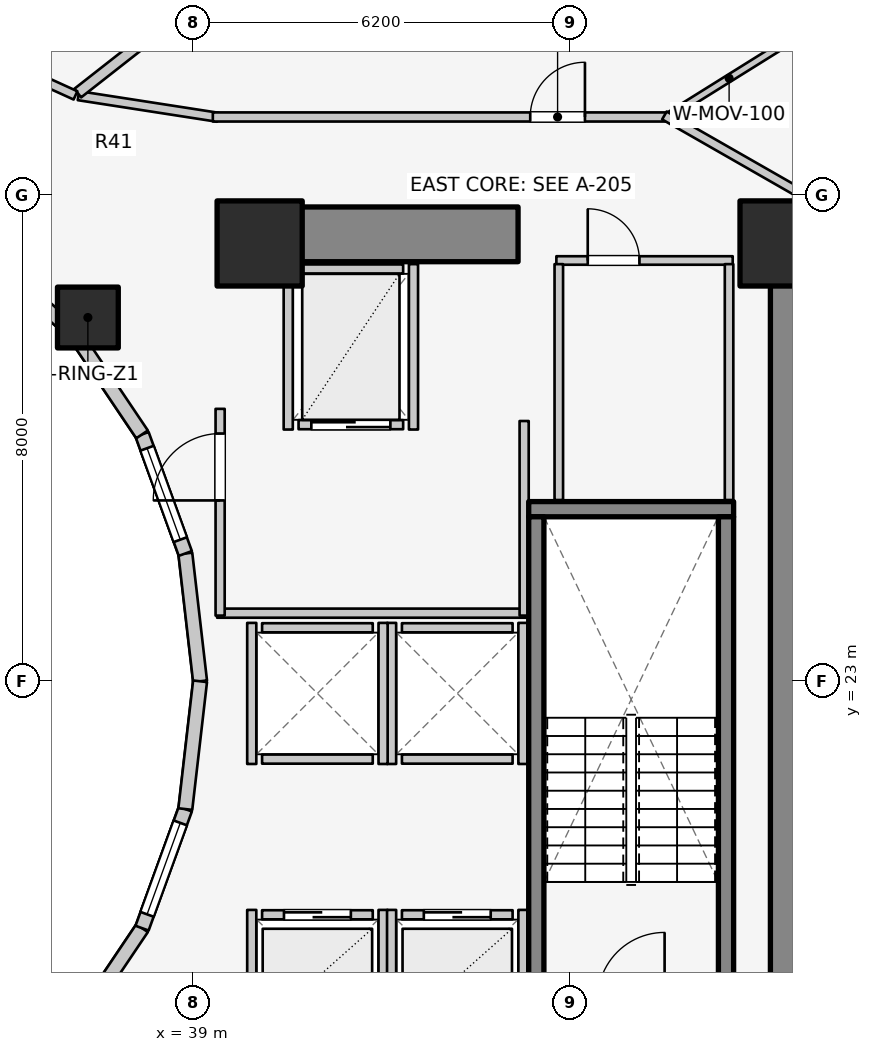
"""IFC4 building model, lengths in metres.
Left out: names, types, materials, properties, quantities, classifications, styles, units other than length and angle.
Written with IfcOpenShell. Run it as: python <this file> out.ifc"""

import sys

from ifc_helpers import new_model, si_unit, direction, frame, frame_2d, origin, origin_2d, place, context, subcontext, project, spatial, rectangle, extrude, element, fill, save


model = new_model("IFC4")
c1 = context("Model", 3, precision=1e-05, world=origin(), true_north=direction((0.0, 1.0)))
c2 = subcontext(c1, "Body", "Model", "MODEL_VIEW")
j1 = project(units=[si_unit("LENGTHUNIT", "METRE"), si_unit("PLANEANGLEUNIT", "RADIAN")], contexts=[c1])
p1 = place(None, origin())
s1 = spatial("IfcSite", under=j1, at=p1, CompositionType="ELEMENT")
p2 = place(p1, origin())
s2 = spatial("IfcBuilding", under=s1, at=p2, CompositionType="ELEMENT")
p3 = place(p2, frame((0.0, 0.0, 40.0)))
s3 = spatial("IfcBuildingStorey", under=s2, at=p3, CompositionType="ELEMENT", Elevation=40.0)
p4 = place(p3, frame((48.95, 17.05, 0.0), z_axis=(0.0, 0.0, 1.0), x_axis=(0.0, 1.0, 0.0)))
e1 = element("IfcWall", 1, at=p4, inside=s3, PredefinedType="SHEAR", context=c2, shape_type="SweptSolid", body=[
    extrude(rectangle(XDim=12.8, YDim=0.9, at=frame_2d((6.4, 0.0))), origin(), (0.0, 0.0, 1.0), 3.1),
])
p5 = place(p3, frame((39.85, 30.35, 0.0), z_axis=(0.0, 0.0, 1.0), x_axis=(1.0, 0.0, 0.0)))
e2 = element("IfcWall", 2, at=p5, inside=s3, PredefinedType="SHEAR", context=c2, shape_type="SweptSolid", body=[
    extrude(rectangle(XDim=4.5, YDim=0.9, at=frame_2d((2.25, 0.0))), origin(), (0.0, 0.0, 1.0), 3.1),
])
p6 = place(p3, frame((44.525, 25.83, 0.0), z_axis=(0.0, 0.0, 1.0), x_axis=(1.0, 0.0, 0.0)))
e3 = element("IfcWall", 3, at=p6, inside=s3, PredefinedType="SOLIDWALL", context=c2, shape_type="SweptSolid", body=[
    extrude(rectangle(XDim=3.37, YDim=0.25, at=frame_2d((1.685, 0.0))), origin(), (0.0, 0.0, 1.0), 3.1),
])
for number, where, z_axis, x_axis in (
    (4, (44.65, 17.895, 0.0), (0.0, 0.0, 1.0), (0.0, 1.0, 0.0)),
    (5, (47.77, 17.895, 0.0), (0.0, 0.0, 1.0), (0.0, 1.0, 0.0)),
):
    element("IfcWall", number, at=place(p3, frame(where, z_axis=z_axis, x_axis=x_axis)), inside=s3, PredefinedType="SOLIDWALL", context=c2, shape_type="SweptSolid", body=[
        extrude(rectangle(XDim=7.81, YDim=0.25, at=frame_2d((3.905, 0.0))), origin(), (0.0, 0.0, 1.0), 3.1),
    ])
for number, where, z_axis, x_axis in (
    (6, (48.7, 30.2, 0.0), (0.0, 0.0, 1.0), (1.0, 0.0, 0.0)),
    (7, (40.1, 30.2, 0.0), (0.0, 0.0, 1.0), (1.0, 0.0, 0.0)),
):
    element("IfcColumn", number, at=place(p3, frame(where, z_axis=z_axis, x_axis=x_axis)), inside=s3, PredefinedType="COLUMN", context=c2, shape_type="SweptSolid", body=[
        extrude(rectangle(XDim=1.4, YDim=1.4, at=origin_2d()), origin(), (0.0, 0.0, 1.0), 3.1),
    ])
p7 = place(p3, frame((37.275, 28.982, 0.0), z_axis=(0.0, 0.0, 1.0), x_axis=(1.0, 0.0, 0.0)))
e8 = element("IfcColumn", 8, at=p7, inside=s3, PredefinedType="COLUMN", context=c2, shape_type="SweptSolid", body=[
    extrude(rectangle(XDim=1.0, YDim=1.0, at=origin_2d()), origin(), (0.0, 0.0, 1.0), 3.1),
])
p8 = place(p3, frame((39.12, 23.0, 0.0), z_axis=(0.0, 0.0, 1.0), x_axis=(-0.114711713601, 0.993398823617, 0.0)))
e9 = element("IfcWall", 9, at=p8, inside=s3, PredefinedType="STANDARD", context=c2, shape_type="SweptSolid", body=[
    extrude(rectangle(XDim=2.115, YDim=0.23, at=frame_2d((1.058, 0.0))), origin(), (0.0, 0.0, 1.0), 2.84),
])
p9 = place(p3, frame((38.877, 25.102, 0.0), z_axis=(0.0, 0.0, 1.0), x_axis=(-0.341423187295, 0.93990968033, 0.0)))
e10 = element("IfcWall", 10, at=p9, inside=s3, PredefinedType="STANDARD", context=c2, shape_type="SweptSolid", body=[
    extrude(rectangle(XDim=2.084, YDim=0.23, at=frame_2d((1.042, 0.0))), origin(), (0.0, 0.0, 1.0), 2.84),
])
p10 = place(p9, frame((0.242, 0.0, 0.85)))
e11 = element("IfcOpeningElement", 11, at=p10, cuts=e10, PredefinedType="OPENING", context=c2, shape_type="SweptSolid", body=[
    extrude(rectangle(XDim=1.6, YDim=1.65, at=frame_2d((0.8, 0.825))), frame((0.0, 0.125, 0.0), z_axis=(0.0, -1.0, 0.0), x_axis=(1.0, 0.0, 0.0)), (0.0, 0.0, 1.0), 0.25),
])
p11 = place(p3, frame((38.166, 27.06, 0.0), z_axis=(0.0, 0.0, 1.0), x_axis=(-0.558197800898, 0.829707909492, 0.0)))
e12 = element("IfcWall", 12, at=p11, inside=s3, PredefinedType="STANDARD", context=c2, shape_type="SweptSolid", body=[
    extrude(rectangle(XDim=2.027, YDim=0.23, at=frame_2d((1.013, 0.0))), origin(), (0.0, 0.0, 1.0), 2.16),
])
p12 = place(p3, frame((37.035, 28.742, 0.0), z_axis=(0.0, 0.0, 1.0), x_axis=(-0.752576694707, 0.658504607869, 0.0)))
e13 = element("IfcWall", 13, at=p12, inside=s3, PredefinedType="STANDARD", context=c2, shape_type="SweptSolid", body=[
    extrude(rectangle(XDim=1.959, YDim=0.23, at=frame_2d((0.98, 0.0))), origin(), (0.0, 0.0, 1.0), 2.16),
])
p13 = place(p3, frame((37.035, 17.258, 0.0), z_axis=(0.0, 0.0, 1.0), x_axis=(0.558197800898, 0.829707909492, 0.0)))
e14 = element("IfcWall", 14, at=p13, inside=s3, PredefinedType="STANDARD", context=c2, shape_type="SweptSolid", body=[
    extrude(rectangle(XDim=2.027, YDim=0.23, at=frame_2d((1.013, 0.0))), origin(), (0.0, 0.0, 1.0), 2.16),
])
p14 = place(p3, frame((38.166, 18.94, 0.0), z_axis=(0.0, 0.0, 1.0), x_axis=(0.341423187295, 0.93990968033, 0.0)))
e15 = element("IfcWall", 15, at=p14, inside=s3, PredefinedType="STANDARD", context=c2, shape_type="SweptSolid", body=[
    extrude(rectangle(XDim=2.084, YDim=0.23, at=frame_2d((1.042, 0.0))), origin(), (0.0, 0.0, 1.0), 2.84),
])
p15 = place(p14, frame((0.242, 0.0, 0.85)))
e16 = element("IfcOpeningElement", 16, at=p15, cuts=e15, PredefinedType="OPENING", context=c2, shape_type="SweptSolid", body=[
    extrude(rectangle(XDim=1.6, YDim=1.65, at=frame_2d((0.8, 0.825))), frame((0.0, 0.125, 0.0), z_axis=(0.0, -1.0, 0.0), x_axis=(1.0, 0.0, 0.0)), (0.0, 0.0, 1.0), 0.25),
])
p16 = place(p3, frame((38.877, 20.898, 0.0), z_axis=(0.0, 0.0, 1.0), x_axis=(0.114711713601, 0.993398823617, 0.0)))
e17 = element("IfcWall", 17, at=p16, inside=s3, PredefinedType="STANDARD", context=c2, shape_type="SweptSolid", body=[
    extrude(rectangle(XDim=2.115, YDim=0.23, at=frame_2d((1.058, 0.0))), origin(), (0.0, 0.0, 1.0), 2.84),
])
p17 = place(p3, frame((40.14, 19.16, 0.0), z_axis=(0.0, 0.0, 1.0), x_axis=(1.0, 0.0, 0.0)))
e18 = element("IfcWall", 18, at=p17, inside=s3, PredefinedType="SOLIDWALL", context=c2, shape_type="SweptSolid", body=[
    extrude(rectangle(XDim=1.82, YDim=0.15, at=frame_2d((0.91, 0.0))), origin(), (0.0, 0.0, 1.0), 2.12),
])
p18 = place(p17, frame((0.36, 0.0, 0.0)))
e19 = element("IfcOpeningElement", 19, at=p18, cuts=e18, PredefinedType="OPENING", context=c2, shape_type="SweptSolid", body=[
    extrude(rectangle(XDim=1.1, YDim=2.1, at=frame_2d((0.55, 1.05))), frame((0.0, 0.085, 0.0), z_axis=(0.0, -1.0, 0.0), x_axis=(1.0, 0.0, 0.0)), (0.0, 0.0, 1.0), 0.17),
])
p19 = place(p3, frame((39.97, 17.02, 0.0), z_axis=(0.0, 0.0, 1.0), x_axis=(0.0, 1.0, 0.0)))
e20 = element("IfcWall", 20, at=p19, inside=s3, PredefinedType="SOLIDWALL", context=c2, shape_type="SweptSolid", body=[
    extrude(rectangle(XDim=2.22, YDim=0.15, at=frame_2d((1.11, 0.0))), origin(), (0.0, 0.0, 1.0), 2.12),
])
p20 = place(p3, frame((42.13, 17.02, 0.0), z_axis=(0.0, 0.0, 1.0), x_axis=(0.0, 1.0, 0.0)))
e21 = element("IfcWall", 21, at=p20, inside=s3, PredefinedType="SOLIDWALL", context=c2, shape_type="SweptSolid", body=[
    extrude(rectangle(XDim=2.22, YDim=0.15, at=frame_2d((1.11, 0.0))), origin(), (0.0, 0.0, 1.0), 2.855),
])
p21 = place(p3, frame((42.44, 19.16, 0.0), z_axis=(0.0, 0.0, 1.0), x_axis=(1.0, 0.0, 0.0)))
e22 = element("IfcWall", 22, at=p21, inside=s3, PredefinedType="SOLIDWALL", context=c2, shape_type="SweptSolid", body=[
    extrude(rectangle(XDim=1.82, YDim=0.15, at=frame_2d((0.91, 0.0))), origin(), (0.0, 0.0, 1.0), 2.855),
])
p22 = place(p21, frame((0.36, 0.0, 0.0)))
e23 = element("IfcOpeningElement", 23, at=p22, cuts=e22, PredefinedType="OPENING", context=c2, shape_type="SweptSolid", body=[
    extrude(rectangle(XDim=1.1, YDim=2.1, at=frame_2d((0.55, 1.05))), frame((0.0, 0.085, 0.0), z_axis=(0.0, -1.0, 0.0), x_axis=(1.0, 0.0, 0.0)), (0.0, 0.0, 1.0), 0.17),
])
p23 = place(p3, frame((42.27, 17.02, 0.0), z_axis=(0.0, 0.0, 1.0), x_axis=(0.0, 1.0, 0.0)))
e24 = element("IfcWall", 24, at=p23, inside=s3, PredefinedType="SOLIDWALL", context=c2, shape_type="SweptSolid", body=[
    extrude(rectangle(XDim=2.22, YDim=0.15, at=frame_2d((1.11, 0.0))), origin(), (0.0, 0.0, 1.0), 2.855),
])
p24 = place(p3, frame((44.43, 17.02, 0.0), z_axis=(0.0, 0.0, 1.0), x_axis=(0.0, 1.0, 0.0)))
e25 = element("IfcWall", 25, at=p24, inside=s3, PredefinedType="SOLIDWALL", context=c2, shape_type="SweptSolid", body=[
    extrude(rectangle(XDim=2.22, YDim=0.15, at=frame_2d((1.11, 0.0))), origin(), (0.0, 0.0, 1.0), 2.12),
])
for number, where, z_axis, x_axis in (
    (26, (42.44, 21.72, 0.0), (0.0, 0.0, 1.0), (1.0, 0.0, 0.0)),
    (27, (42.44, 23.88, 0.0), (0.0, 0.0, 1.0), (1.0, 0.0, 0.0)),
):
    element("IfcWall", number, at=place(p3, frame(where, z_axis=z_axis, x_axis=x_axis)), inside=s3, PredefinedType="SOLIDWALL", context=c2, shape_type="SweptSolid", body=[
        extrude(rectangle(XDim=1.82, YDim=0.15, at=frame_2d((0.91, 0.0))), origin(), (0.0, 0.0, 1.0), 2.855),
    ])
for number, where, z_axis, x_axis in (
    (28, (42.27, 21.64, 0.0), (0.0, 0.0, 1.0), (0.0, 1.0, 0.0)),
    (29, (44.43, 21.64, 0.0), (0.0, 0.0, 1.0), (0.0, 1.0, 0.0)),
):
    element("IfcWall", number, at=place(p3, frame(where, z_axis=z_axis, x_axis=x_axis)), inside=s3, PredefinedType="SOLIDWALL", context=c2, shape_type="SweptSolid", body=[
        extrude(rectangle(XDim=2.32, YDim=0.15, at=frame_2d((1.16, 0.0))), origin(), (0.0, 0.0, 1.0), 2.855),
    ])
for number, where, z_axis, x_axis in (
    (30, (40.14, 21.72, 0.0), (0.0, 0.0, 1.0), (1.0, 0.0, 0.0)),
    (31, (40.14, 23.88, 0.0), (0.0, 0.0, 1.0), (1.0, 0.0, 0.0)),
):
    element("IfcWall", number, at=place(p3, frame(where, z_axis=z_axis, x_axis=x_axis)), inside=s3, PredefinedType="SOLIDWALL", context=c2, shape_type="SweptSolid", body=[
        extrude(rectangle(XDim=1.82, YDim=0.15, at=frame_2d((0.91, 0.0))), origin(), (0.0, 0.0, 1.0), 2.12),
    ])
p25 = place(p3, frame((39.97, 21.64, 0.0), z_axis=(0.0, 0.0, 1.0), x_axis=(0.0, 1.0, 0.0)))
e32 = element("IfcWall", 32, at=p25, inside=s3, PredefinedType="SOLIDWALL", context=c2, shape_type="SweptSolid", body=[
    extrude(rectangle(XDim=2.32, YDim=0.15, at=frame_2d((1.16, 0.0))), origin(), (0.0, 0.0, 1.0), 2.12),
])
p26 = place(p3, frame((42.13, 21.64, 0.0), z_axis=(0.0, 0.0, 1.0), x_axis=(0.0, 1.0, 0.0)))
e33 = element("IfcWall", 33, at=p26, inside=s3, PredefinedType="SOLIDWALL", context=c2, shape_type="SweptSolid", body=[
    extrude(rectangle(XDim=2.32, YDim=0.15, at=frame_2d((1.16, 0.0))), origin(), (0.0, 0.0, 1.0), 2.855),
])
p27 = place(p3, frame((40.74, 27.22, 0.0), z_axis=(0.0, 0.0, 1.0), x_axis=(1.0, 0.0, 0.0)))
e34 = element("IfcWall", 34, at=p27, inside=s3, PredefinedType="SOLIDWALL", context=c2, shape_type="SweptSolid", body=[
    extrude(rectangle(XDim=1.72, YDim=0.15, at=frame_2d((0.86, 0.0))), origin(), (0.0, 0.0, 1.0), 2.855),
])
p28 = place(p27, frame((0.21, 0.0, 0.0)))
e35 = element("IfcOpeningElement", 35, at=p28, cuts=e34, PredefinedType="OPENING", context=c2, shape_type="SweptSolid", body=[
    extrude(rectangle(XDim=1.3, YDim=2.1, at=frame_2d((0.65, 1.05))), frame((0.0, 0.085, 0.0), z_axis=(0.0, -1.0, 0.0), x_axis=(1.0, 0.0, 0.0)), (0.0, 0.0, 1.0), 0.17),
])
p29 = place(p3, frame((40.74, 29.78, 0.0), z_axis=(0.0, 0.0, 1.0), x_axis=(1.0, 0.0, 0.0)))
e36 = element("IfcWall", 36, at=p29, inside=s3, PredefinedType="SOLIDWALL", context=c2, shape_type="SweptSolid", body=[
    extrude(rectangle(XDim=1.72, YDim=0.15, at=frame_2d((0.86, 0.0))), origin(), (0.0, 0.0, 1.0), 2.855),
])
for number, where, z_axis, x_axis in (
    (37, (40.57, 27.14, 0.0), (0.0, 0.0, 1.0), (0.0, 1.0, 0.0)),
    (38, (42.63, 27.14, 0.0), (0.0, 0.0, 1.0), (0.0, 1.0, 0.0)),
):
    element("IfcWall", number, at=place(p3, frame(where, z_axis=z_axis, x_axis=x_axis)), inside=s3, PredefinedType="SOLIDWALL", context=c2, shape_type="SweptSolid", body=[
        extrude(rectangle(XDim=2.72, YDim=0.15, at=frame_2d((1.36, 0.0))), origin(), (0.0, 0.0, 1.0), 2.855),
    ])
p30 = place(p3, frame((39.4, 24.12, 0.0), z_axis=(0.0, 0.0, 1.0), x_axis=(1.0, 0.0, 0.0)))
e39 = element("IfcWall", 39, at=p30, inside=s3, PredefinedType="PARTITIONING", context=c2, shape_type="SweptSolid", body=[
    extrude(rectangle(XDim=5.08, YDim=0.15, at=frame_2d((2.54, 0.0))), origin(), (0.0, 0.0, 1.0), 2.12),
])
p31 = place(p3, frame((44.45, 24.08, 0.0), z_axis=(0.0, 0.0, 1.0), x_axis=(0.0, 1.0, 0.0)))
e40 = element("IfcWall", 40, at=p31, inside=s3, PredefinedType="PARTITIONING", context=c2, shape_type="SweptSolid", body=[
    extrude(rectangle(XDim=3.2, YDim=0.15, at=frame_2d((1.6, 0.0))), origin(), (0.0, 0.0, 1.0), 2.855),
])
p32 = place(p3, frame((39.45, 24.08, 0.0), z_axis=(0.0, 0.0, 1.0), x_axis=(0.0, 1.0, 0.0)))
e41 = element("IfcWall", 41, at=p32, inside=s3, PredefinedType="PARTITIONING", context=c2, shape_type="SweptSolid", body=[
    extrude(rectangle(XDim=3.4, YDim=0.15, at=frame_2d((1.7, 0.0))), origin(), (0.0, 0.0, 1.0), 2.855),
])
p33 = place(p32, frame((1.894, 0.0, 0.0)))
e42 = element("IfcOpeningElement", 42, at=p33, cuts=e41, PredefinedType="OPENING", context=c2, shape_type="SweptSolid", body=[
    extrude(rectangle(XDim=1.1, YDim=2.1, at=frame_2d((0.55, 1.05))), frame((0.0, 0.085, 0.0), z_axis=(0.0, -1.0, 0.0), x_axis=(1.0, 0.0, 0.0)), (0.0, 0.0, 1.0), 0.17),
])
p34 = place(p3, frame((44.98, 29.92, 0.0), z_axis=(0.0, 0.0, 1.0), x_axis=(1.0, 0.0, 0.0)))
e43 = element("IfcWall", 43, at=p34, inside=s3, PredefinedType="PLUMBINGWALL", context=c2, shape_type="SweptSolid", body=[
    extrude(rectangle(XDim=2.9, YDim=0.14, at=frame_2d((1.45, 0.0))), origin(), (0.0, 0.0, 1.0), 2.855),
])
p35 = place(p34, frame((0.516, 0.0, 0.0)))
e44 = element("IfcOpeningElement", 44, at=p35, cuts=e43, PredefinedType="OPENING", context=c2, shape_type="SweptSolid", body=[
    extrude(rectangle(XDim=0.85, YDim=2.05, at=frame_2d((0.425, 1.025))), frame((0.0, 0.08, 0.0), z_axis=(0.0, -1.0, 0.0), x_axis=(1.0, 0.0, 0.0)), (0.0, 0.0, 1.0), 0.16),
])
for number, where, z_axis, x_axis in (
    (45, (45.02, 25.98, 0.0), (0.0, 0.0, 1.0), (0.0, 1.0, 0.0)),
    (46, (47.82, 25.98, 0.0), (0.0, 0.0, 1.0), (0.0, 1.0, 0.0)),
):
    element("IfcWall", number, at=place(p3, frame(where, z_axis=z_axis, x_axis=x_axis)), inside=s3, PredefinedType="PLUMBINGWALL", context=c2, shape_type="SweptSolid", body=[
        extrude(rectangle(XDim=3.88, YDim=0.14, at=frame_2d((1.94, 0.0))), origin(), (0.0, 0.0, 1.0), 2.855),
    ])
p36 = place(p3, frame((46.758, 32.253, 0.0), z_axis=(0.0, 0.0, 1.0), x_axis=(0.848408422278, 0.529342185177, 0.0)))
e47 = element("IfcWall", 47, at=p36, inside=s3, PredefinedType="MOVABLE", context=c2, shape_type="SweptSolid", body=[
    extrude(rectangle(XDim=2.507, YDim=0.12, at=frame_2d((1.253, 0.0))), origin(), (0.0, 0.0, 1.0), 2.855),
])
p37 = place(p3, frame((37.119, 32.631, 0.0), z_axis=(0.0, 0.0, 1.0), x_axis=(0.988184633586, -0.153268163508, 0.0)))
e48 = element("IfcWall", 48, at=p37, inside=s3, PredefinedType="PARTITIONING", context=c2, shape_type="SweptSolid", body=[
    extrude(rectangle(XDim=2.318, YDim=0.15, at=frame_2d((1.159, 0.0))), origin(), (0.0, 0.0, 1.0), 2.237),
])
p38 = place(p3, frame((39.33, 32.28, 0.0), z_axis=(0.0, 0.0, 1.0), x_axis=(1.0, 0.0, 0.0)))
e49 = element("IfcWall", 49, at=p38, inside=s3, PredefinedType="PARTITIONING", context=c2, shape_type="SweptSolid", body=[
    extrude(rectangle(XDim=7.52, YDim=0.15, at=frame_2d((3.76, 0.0))), origin(), (0.0, 0.0, 1.0), 2.237),
])
p39 = place(p38, frame((5.22, 0.0, 0.0)))
e50 = element("IfcOpeningElement", 50, at=p39, cuts=e49, PredefinedType="OPENING", context=c2, shape_type="SweptSolid", body=[
    extrude(rectangle(XDim=0.9, YDim=2.1, at=frame_2d((0.45, 1.05))), frame((0.0, 0.085, 0.0), z_axis=(0.0, -1.0, 0.0), x_axis=(1.0, 0.0, 0.0)), (0.0, 0.0, 1.0), 0.17),
])
p40 = place(p3, frame((46.757, 32.305, 0.0), z_axis=(0.0, 0.0, 1.0), x_axis=(0.867991349648, -0.496579315857, 0.0)))
e51 = element("IfcWall", 51, at=p40, inside=s3, PredefinedType="PARTITIONING", context=c2, shape_type="SweptSolid", body=[
    extrude(rectangle(XDim=2.567, YDim=0.15, at=frame_2d((1.283, 0.0))), origin(), (0.0, 0.0, 1.0), 2.069),
])
p41 = place(p3, frame((37.108, 32.673, 0.0), z_axis=(0.0, 0.0, 1.0), x_axis=(0.78700868866, 0.616941912966, 0.0)))
e52 = element("IfcWall", 52, at=p41, inside=s3, PredefinedType="PARTITIONING", context=c2, shape_type="SweptSolid", body=[
    extrude(rectangle(XDim=10.583, YDim=0.18, at=frame_2d((5.292, 0.0))), origin(), (0.0, 0.0, 1.0), 2.237),
])
p42 = place(p3, frame((37.071, 32.635, 0.0), z_axis=(0.0, 0.0, 1.0), x_axis=(-0.910186679378, 0.414198272186, 0.0)))
e53 = element("IfcWall", 53, at=p42, inside=s3, PredefinedType="PARTITIONING", context=c2, shape_type="SweptSolid", body=[
    extrude(rectangle(XDim=2.698, YDim=0.15, at=frame_2d((1.349, 0.0))), origin(), (0.0, 0.0, 1.0), 2.237),
])
p43 = place(p42, frame((0.874, 0.0, 0.0)))
e54 = element("IfcOpeningElement", 54, at=p43, cuts=e53, PredefinedType="OPENING", context=c2, shape_type="SweptSolid", body=[
    extrude(rectangle(XDim=0.95, YDim=2.1, at=frame_2d((0.475, 1.05))), frame((0.0, 0.085, 0.0), z_axis=(0.0, -1.0, 0.0), x_axis=(1.0, 0.0, 0.0)), (0.0, 0.0, 1.0), 0.17),
])
p44 = place(p10, origin())
e55 = element("IfcWindow", 55, at=p44, inside=s3, PartitioningType="SINGLE_PANEL", PredefinedType="WINDOW", context=c2, shape_type="SweptSolid", body=[
    extrude(rectangle(XDim=1.6, YDim=1.65, at=frame_2d((0.8, 0.825))), frame((0.0, 0.03, 0.0), z_axis=(0.0, -1.0, 0.0), x_axis=(1.0, 0.0, 0.0)), (0.0, 0.0, 1.0), 0.06),
])
fill(e11, e55)
p45 = place(p15, origin())
e56 = element("IfcWindow", 56, at=p45, inside=s3, PartitioningType="SINGLE_PANEL", PredefinedType="WINDOW", context=c2, shape_type="SweptSolid", body=[
    extrude(rectangle(XDim=1.6, YDim=1.65, at=frame_2d((0.8, 0.825))), frame((0.0, 0.03, 0.0), z_axis=(0.0, -1.0, 0.0), x_axis=(1.0, 0.0, 0.0)), (0.0, 0.0, 1.0), 0.06),
])
fill(e16, e56)
p46 = place(p18, origin())
e57 = element("IfcDoor", 57, at=p46, inside=s3, OperationType="DOUBLE_DOOR_SLIDING", PredefinedType="DOOR", context=c2, shape_type="SweptSolid", body=[
    extrude(rectangle(XDim=1.1, YDim=2.1, at=frame_2d((0.55, 1.05))), frame((0.0, 0.025, 0.0), z_axis=(0.0, -1.0, 0.0), x_axis=(1.0, 0.0, 0.0)), (0.0, 0.0, 1.0), 0.05),
])
fill(e19, e57)
p47 = place(p22, origin())
e58 = element("IfcDoor", 58, at=p47, inside=s3, OperationType="DOUBLE_DOOR_SLIDING", PredefinedType="DOOR", context=c2, shape_type="SweptSolid", body=[
    extrude(rectangle(XDim=1.1, YDim=2.1, at=frame_2d((0.55, 1.05))), frame((0.0, 0.025, 0.0), z_axis=(0.0, -1.0, 0.0), x_axis=(1.0, 0.0, 0.0)), (0.0, 0.0, 1.0), 0.05),
])
fill(e23, e58)
p48 = place(p28, origin())
e59 = element("IfcDoor", 59, at=p48, inside=s3, OperationType="DOUBLE_DOOR_SLIDING", PredefinedType="DOOR", context=c2, shape_type="SweptSolid", body=[
    extrude(rectangle(XDim=1.3, YDim=2.1, at=frame_2d((0.65, 1.05))), frame((0.0, 0.025, 0.0), z_axis=(0.0, -1.0, 0.0), x_axis=(1.0, 0.0, 0.0)), (0.0, 0.0, 1.0), 0.05),
])
fill(e35, e59)
p49 = place(p33, origin())
e60 = element("IfcDoor", 60, at=p49, inside=s3, OperationType="SINGLE_SWING_LEFT", PredefinedType="DOOR", context=c2, shape_type="SweptSolid", body=[
    extrude(rectangle(XDim=1.1, YDim=2.1, at=frame_2d((0.55, 1.05))), frame((0.0, 0.025, 0.0), z_axis=(0.0, -1.0, 0.0), x_axis=(1.0, 0.0, 0.0)), (0.0, 0.0, 1.0), 0.05),
])
fill(e42, e60)
p50 = place(p35, origin())
e61 = element("IfcDoor", 61, at=p50, inside=s3, OperationType="SINGLE_SWING_LEFT", PredefinedType="DOOR", context=c2, shape_type="SweptSolid", body=[
    extrude(rectangle(XDim=0.85, YDim=2.05, at=frame_2d((0.425, 1.025))), frame((0.0, 0.025, 0.0), z_axis=(0.0, -1.0, 0.0), x_axis=(1.0, 0.0, 0.0)), (0.0, 0.0, 1.0), 0.05),
])
fill(e44, e61)
p51 = place(p39, origin())
e62 = element("IfcDoor", 62, at=p51, inside=s3, OperationType="SINGLE_SWING_RIGHT", PredefinedType="DOOR", context=c2, shape_type="SweptSolid", body=[
    extrude(rectangle(XDim=0.9, YDim=2.1, at=frame_2d((0.45, 1.05))), frame((0.0, 0.025, 0.0), z_axis=(0.0, -1.0, 0.0), x_axis=(1.0, 0.0, 0.0)), (0.0, 0.0, 1.0), 0.05),
])
fill(e50, e62)
save(model, sys.argv[1])
